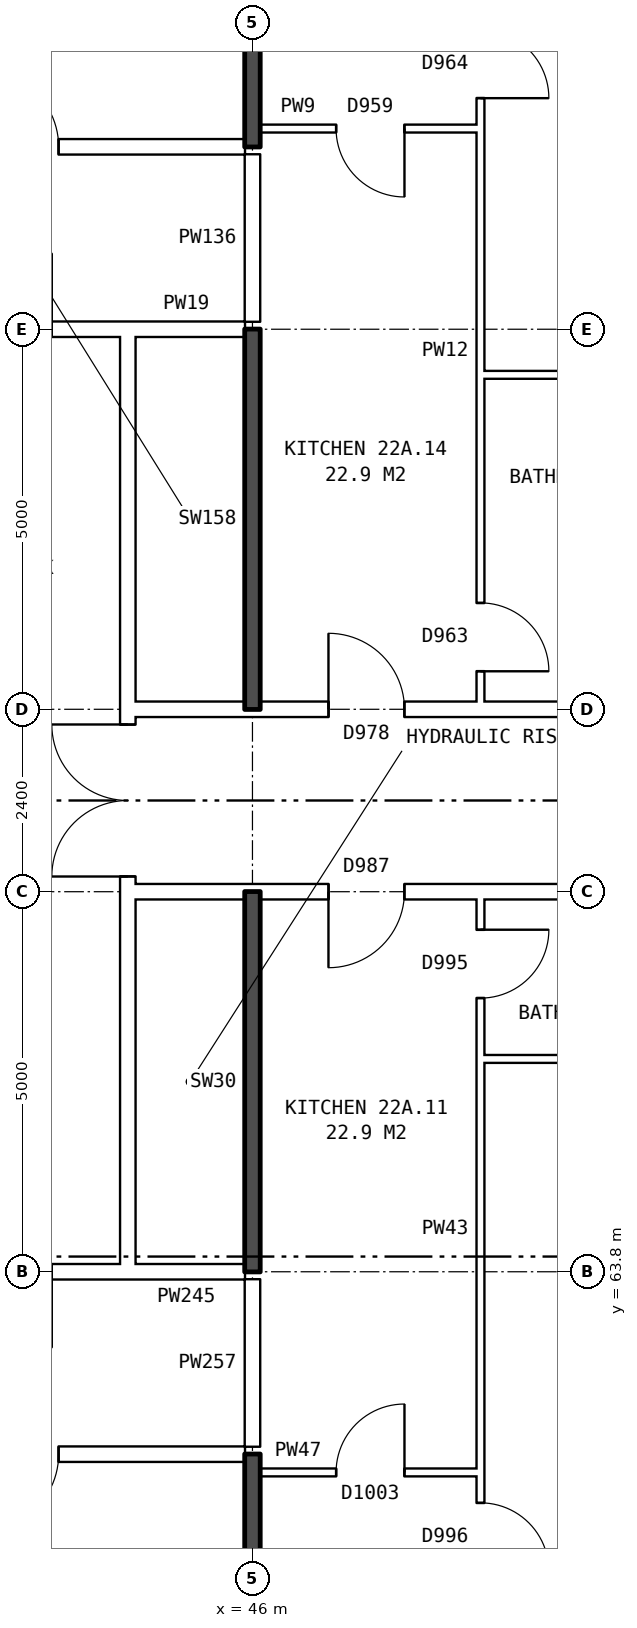
"""IFC4 building model, lengths in metres.
Left out: names, types, materials, properties, quantities, classifications, styles, units other than length and angle.
Written with IfcOpenShell. Run it as: python <this file> out.ifc"""

import sys

from ifc_helpers import new_model, si_unit, direction, frame, frame_2d, origin, place, context, subcontext, project, spatial, rectangle, extrude, element, fill, save


model = new_model("IFC4")
c1 = context("Model", 3, precision=1e-05, world=origin(), true_north=direction((0.0, 1.0)))
c2 = subcontext(c1, "Body", "Model", "MODEL_VIEW")
j1 = project(units=[si_unit("LENGTHUNIT", "METRE"), si_unit("PLANEANGLEUNIT", "RADIAN")], contexts=[c1])
p1 = place(None, origin())
s1 = spatial("IfcSite", under=j1, at=p1, CompositionType="ELEMENT")
p2 = place(p1, origin())
s2 = spatial("IfcBuilding", under=s1, at=p2, CompositionType="ELEMENT")
p3 = place(p2, frame((0.0, 0.0, 80.9)))
s3 = spatial("IfcBuildingStorey", under=s2, at=p3, CompositionType="ELEMENT", Elevation=80.9)
p4 = place(p3, frame((44.36, 63.9, 0.0), z_axis=(0.0, 0.0, 1.0), x_axis=(0.0, 1.0, 0.0)))
e1 = element("IfcWall", 1, at=p4, inside=s3, PredefinedType="PARTITIONING", context=c2, shape_type="SweptSolid", body=[
    extrude(rectangle(XDim=12.2, YDim=0.2, at=frame_2d((6.1, 0.0))), origin(), (0.0, 0.0, 1.0), 2.85),
])
p5 = place(p4, frame((5.1, 0.0, 0.0)))
e2 = element("IfcOpeningElement", 2, at=p5, cuts=e1, PredefinedType="OPENING", context=c2, shape_type="SweptSolid", body=[
    extrude(rectangle(XDim=2.0, YDim=2.1, at=frame_2d((1.0, 1.05))), frame((0.0, 0.11, 0.0), z_axis=(0.0, -1.0, 0.0), x_axis=(1.0, 0.0, 0.0)), (0.0, 0.0, 1.0), 0.22),
])
p6 = place(p3, frame((46.1, 61.16, 0.0), z_axis=(0.0, 0.0, 1.0), x_axis=(1.0, 0.0, 0.0)))
e3 = element("IfcWall", 3, at=p6, inside=s3, PredefinedType="PARTITIONING", context=c2, shape_type="SweptSolid", body=[
    extrude(rectangle(XDim=2.9, YDim=0.1, at=frame_2d((1.45, 0.0))), origin(), (0.0, 0.0, 1.0), 2.85),
])
p7 = place(p6, frame((1.0, 0.0, 0.0)))
e4 = element("IfcOpeningElement", 4, at=p7, cuts=e3, PredefinedType="OPENING", context=c2, shape_type="SweptSolid", body=[
    extrude(rectangle(XDim=0.9, YDim=2.1, at=frame_2d((0.45, 1.05))), frame((0.0, 0.06, 0.0), z_axis=(0.0, -1.0, 0.0), x_axis=(1.0, 0.0, 0.0)), (0.0, 0.0, 1.0), 0.12),
])
p8 = place(p3, frame((23.61, 61.4, 0.0), z_axis=(0.0, 0.0, 1.0), x_axis=(1.0, 0.0, 0.0)))
e5 = element("IfcWall", 5, at=p8, inside=s3, PredefinedType="PARTITIONING", context=c2, shape_type="SweptSolid", body=[
    extrude(rectangle(XDim=22.29, YDim=0.2, at=frame_2d((11.145, 0.0))), origin(), (0.0, 0.0, 1.0), 2.85),
])
p9 = place(p8, frame((18.84, 0.0, 0.0)))
e6 = element("IfcOpeningElement", 6, at=p9, cuts=e5, PredefinedType="OPENING", context=c2, shape_type="SweptSolid", body=[
    extrude(rectangle(XDim=1.0, YDim=2.1, at=frame_2d((0.5, 1.05))), frame((0.0, 0.11, 0.0), z_axis=(0.0, -1.0, 0.0), x_axis=(1.0, 0.0, 0.0)), (0.0, 0.0, 1.0), 0.22),
])
p10 = place(p8, frame((6.89, 0.0, 0.0)))
e7 = element("IfcOpeningElement", 7, at=p10, cuts=e5, PredefinedType="OPENING", context=c2, shape_type="SweptSolid", body=[
    extrude(rectangle(XDim=1.0, YDim=2.1, at=frame_2d((0.5, 1.05))), frame((0.0, 0.11, 0.0), z_axis=(0.0, -1.0, 0.0), x_axis=(1.0, 0.0, 0.0)), (0.0, 0.0, 1.0), 0.22),
])
p11 = place(p3, frame((41.36, 63.8, 0.0), z_axis=(0.0, 0.0, 1.0), x_axis=(1.0, 0.0, 0.0)))
e8 = element("IfcWall", 8, at=p11, inside=s3, PredefinedType="PARTITIONING", context=c2, shape_type="SweptSolid", body=[
    extrude(rectangle(XDim=3.0, YDim=0.2, at=frame_2d((1.5, 0.0))), origin(), (0.0, 0.0, 1.0), 2.85),
])
p12 = place(p11, frame((1.0, 0.0, 0.0)))
e9 = element("IfcOpeningElement", 9, at=p12, cuts=e8, PredefinedType="OPENING", context=c2, shape_type="SweptSolid", body=[
    extrude(rectangle(XDim=1.0, YDim=2.1, at=frame_2d((0.5, 1.05))), frame((0.0, 0.11, 0.0), z_axis=(0.0, -1.0, 0.0), x_axis=(1.0, 0.0, 0.0)), (0.0, 0.0, 1.0), 0.22),
])
p13 = place(p3, frame((44.36, 63.8, 0.0), z_axis=(0.0, 0.0, 1.0), x_axis=(1.0, 0.0, 0.0)))
e10 = element("IfcWall", 10, at=p13, inside=s3, PredefinedType="PARTITIONING", context=c2, shape_type="SweptSolid", body=[
    extrude(rectangle(XDim=1.54, YDim=0.2, at=frame_2d((0.77, 0.0))), origin(), (0.0, 0.0, 1.0), 2.85),
])
p14 = place(p3, frame((49.0, 66.6, 0.0), z_axis=(0.0, 0.0, 1.0), x_axis=(1.0, 0.0, 0.0)))
e11 = element("IfcWall", 11, at=p14, inside=s3, PredefinedType="PARTITIONING", context=c2, shape_type="SweptSolid", body=[
    extrude(rectangle(XDim=6.0, YDim=0.1, at=frame_2d((3.0, 0.0))), origin(), (0.0, 0.0, 1.0), 2.85),
])
p15 = place(p3, frame((44.36, 68.8, 0.0), z_axis=(0.0, 0.0, 1.0), x_axis=(1.0, 0.0, 0.0)))
e12 = element("IfcWall", 12, at=p15, inside=s3, PredefinedType="PARTITIONING", context=c2, shape_type="SweptSolid", body=[
    extrude(rectangle(XDim=19.28, YDim=0.2, at=frame_2d((9.64, 0.0))), origin(), (0.0, 0.0, 1.0), 2.85),
])
p16 = place(p15, frame((14.64, 0.0, 0.0)))
e13 = element("IfcOpeningElement", 13, at=p16, cuts=e12, PredefinedType="OPENING", context=c2, shape_type="SweptSolid", body=[
    extrude(rectangle(XDim=1.0, YDim=2.1, at=frame_2d((0.5, 1.05))), frame((0.0, 0.11, 0.0), z_axis=(0.0, -1.0, 0.0), x_axis=(1.0, 0.0, 0.0)), (0.0, 0.0, 1.0), 0.22),
])
p17 = place(p15, frame((11.64, 0.0, 0.0)))
e14 = element("IfcOpeningElement", 14, at=p17, cuts=e12, PredefinedType="OPENING", context=c2, shape_type="SweptSolid", body=[
    extrude(rectangle(XDim=1.0, YDim=2.1, at=frame_2d((0.5, 1.05))), frame((0.0, 0.11, 0.0), z_axis=(0.0, -1.0, 0.0), x_axis=(1.0, 0.0, 0.0)), (0.0, 0.0, 1.0), 0.22),
])
p18 = place(p15, frame((2.64, 0.0, 0.0)))
e15 = element("IfcOpeningElement", 15, at=p18, cuts=e12, PredefinedType="OPENING", context=c2, shape_type="SweptSolid", body=[
    extrude(rectangle(XDim=1.0, YDim=2.1, at=frame_2d((0.5, 1.05))), frame((0.0, 0.11, 0.0), z_axis=(0.0, -1.0, 0.0), x_axis=(1.0, 0.0, 0.0)), (0.0, 0.0, 1.0), 0.22),
])
p19 = place(p3, frame((44.36, 71.2, 0.0), z_axis=(0.0, 0.0, 1.0), x_axis=(1.0, 0.0, 0.0)))
e16 = element("IfcWall", 16, at=p19, inside=s3, PredefinedType="PARTITIONING", context=c2, shape_type="SweptSolid", body=[
    extrude(rectangle(XDim=19.28, YDim=0.2, at=frame_2d((9.64, 0.0))), origin(), (0.0, 0.0, 1.0), 2.85),
])
p20 = place(p19, frame((14.64, 0.0, 0.0)))
e17 = element("IfcOpeningElement", 17, at=p20, cuts=e16, PredefinedType="OPENING", context=c2, shape_type="SweptSolid", body=[
    extrude(rectangle(XDim=1.0, YDim=2.1, at=frame_2d((0.5, 1.05))), frame((0.0, 0.11, 0.0), z_axis=(0.0, -1.0, 0.0), x_axis=(1.0, 0.0, 0.0)), (0.0, 0.0, 1.0), 0.22),
])
p21 = place(p19, frame((8.64, 0.0, 0.0)))
e18 = element("IfcOpeningElement", 18, at=p21, cuts=e16, PredefinedType="OPENING", context=c2, shape_type="SweptSolid", body=[
    extrude(rectangle(XDim=1.0, YDim=2.1, at=frame_2d((0.5, 1.05))), frame((0.0, 0.11, 0.0), z_axis=(0.0, -1.0, 0.0), x_axis=(1.0, 0.0, 0.0)), (0.0, 0.0, 1.0), 0.22),
])
p22 = place(p19, frame((2.64, 0.0, 0.0)))
e19 = element("IfcOpeningElement", 19, at=p22, cuts=e16, PredefinedType="OPENING", context=c2, shape_type="SweptSolid", body=[
    extrude(rectangle(XDim=1.0, YDim=2.1, at=frame_2d((0.5, 1.05))), frame((0.0, 0.11, 0.0), z_axis=(0.0, -1.0, 0.0), x_axis=(1.0, 0.0, 0.0)), (0.0, 0.0, 1.0), 0.22),
])
p23 = place(p3, frame((49.0, 75.6, 0.0), z_axis=(0.0, 0.0, 1.0), x_axis=(1.0, 0.0, 0.0)))
e20 = element("IfcWall", 20, at=p23, inside=s3, PredefinedType="PARTITIONING", context=c2, shape_type="SweptSolid", body=[
    extrude(rectangle(XDim=2.9, YDim=0.1, at=frame_2d((1.45, 0.0))), origin(), (0.0, 0.0, 1.0), 2.85),
])
p24 = place(p3, frame((41.36, 76.2, 0.0), z_axis=(0.0, 0.0, 1.0), x_axis=(1.0, 0.0, 0.0)))
e21 = element("IfcWall", 21, at=p24, inside=s3, PredefinedType="PARTITIONING", context=c2, shape_type="SweptSolid", body=[
    extrude(rectangle(XDim=3.0, YDim=0.2, at=frame_2d((1.5, 0.0))), origin(), (0.0, 0.0, 1.0), 2.85),
])
p25 = place(p24, frame((1.0, 0.0, 0.0)))
e22 = element("IfcOpeningElement", 22, at=p25, cuts=e21, PredefinedType="OPENING", context=c2, shape_type="SweptSolid", body=[
    extrude(rectangle(XDim=1.0, YDim=2.1, at=frame_2d((0.5, 1.05))), frame((0.0, 0.11, 0.0), z_axis=(0.0, -1.0, 0.0), x_axis=(1.0, 0.0, 0.0)), (0.0, 0.0, 1.0), 0.22),
])
p26 = place(p3, frame((44.36, 76.2, 0.0), z_axis=(0.0, 0.0, 1.0), x_axis=(1.0, 0.0, 0.0)))
e23 = element("IfcWall", 23, at=p26, inside=s3, PredefinedType="PARTITIONING", context=c2, shape_type="SweptSolid", body=[
    extrude(rectangle(XDim=1.54, YDim=0.2, at=frame_2d((0.77, 0.0))), origin(), (0.0, 0.0, 1.0), 2.85),
])
p27 = place(p3, frame((23.61, 78.6, 0.0), z_axis=(0.0, 0.0, 1.0), x_axis=(1.0, 0.0, 0.0)))
e24 = element("IfcWall", 24, at=p27, inside=s3, PredefinedType="PARTITIONING", context=c2, shape_type="SweptSolid", body=[
    extrude(rectangle(XDim=22.29, YDim=0.2, at=frame_2d((11.145, 0.0))), origin(), (0.0, 0.0, 1.0), 2.85),
])
p28 = place(p27, frame((18.84, 0.0, 0.0)))
e25 = element("IfcOpeningElement", 25, at=p28, cuts=e24, PredefinedType="OPENING", context=c2, shape_type="SweptSolid", body=[
    extrude(rectangle(XDim=1.0, YDim=2.1, at=frame_2d((0.5, 1.05))), frame((0.0, 0.11, 0.0), z_axis=(0.0, -1.0, 0.0), x_axis=(1.0, 0.0, 0.0)), (0.0, 0.0, 1.0), 0.22),
])
p29 = place(p27, frame((6.89, 0.0, 0.0)))
e26 = element("IfcOpeningElement", 26, at=p29, cuts=e24, PredefinedType="OPENING", context=c2, shape_type="SweptSolid", body=[
    extrude(rectangle(XDim=1.0, YDim=2.1, at=frame_2d((0.5, 1.05))), frame((0.0, 0.11, 0.0), z_axis=(0.0, -1.0, 0.0), x_axis=(1.0, 0.0, 0.0)), (0.0, 0.0, 1.0), 0.22),
])
p30 = place(p3, frame((46.1, 78.84, 0.0), z_axis=(0.0, 0.0, 1.0), x_axis=(1.0, 0.0, 0.0)))
e27 = element("IfcWall", 27, at=p30, inside=s3, PredefinedType="PARTITIONING", context=c2, shape_type="SweptSolid", body=[
    extrude(rectangle(XDim=2.9, YDim=0.1, at=frame_2d((1.45, 0.0))), origin(), (0.0, 0.0, 1.0), 2.85),
])
p31 = place(p30, frame((1.0, 0.0, 0.0)))
e28 = element("IfcOpeningElement", 28, at=p31, cuts=e27, PredefinedType="OPENING", context=c2, shape_type="SweptSolid", body=[
    extrude(rectangle(XDim=0.9, YDim=2.1, at=frame_2d((0.45, 1.05))), frame((0.0, 0.06, 0.0), z_axis=(0.0, -1.0, 0.0), x_axis=(1.0, 0.0, 0.0)), (0.0, 0.0, 1.0), 0.12),
])
p32 = place(p3, frame((46.0, 54.36, 0.0), z_axis=(0.0, 0.0, 1.0), x_axis=(0.0, 1.0, 0.0)))
e29 = element("IfcWall", 29, at=p32, inside=s3, PredefinedType="SOLIDWALL", context=c2, shape_type="SweptSolid", body=[
    extrude(rectangle(XDim=7.04, YDim=0.2, at=frame_2d((3.52, 0.0))), origin(), (0.0, 0.0, 1.0), 2.85),
])
p33 = place(p3, frame((46.0, 61.5, 0.0), z_axis=(0.0, 0.0, 1.0), x_axis=(0.0, 1.0, 0.0)))
e30 = element("IfcWall", 30, at=p33, inside=s3, PredefinedType="PARTITIONING", context=c2, shape_type="SweptSolid", body=[
    extrude(rectangle(XDim=2.2, YDim=0.2, at=frame_2d((1.1, 0.0))), origin(), (0.0, 0.0, 1.0), 2.85),
])
for number, where, z_axis, x_axis in (
    (31, (46.0, 63.8, 0.0), (0.0, 0.0, 1.0), (0.0, 1.0, 0.0)),
    (32, (46.0, 71.2, 0.0), (0.0, 0.0, 1.0), (0.0, 1.0, 0.0)),
):
    element("IfcWall", number, at=place(p3, frame(where, z_axis=z_axis, x_axis=x_axis)), inside=s3, PredefinedType="SOLIDWALL", context=c2, shape_type="SweptSolid", body=[
        extrude(rectangle(XDim=5.0, YDim=0.2, at=frame_2d((2.5, 0.0))), origin(), (0.0, 0.0, 1.0), 2.85),
    ])
p34 = place(p3, frame((46.0, 76.3, 0.0), z_axis=(0.0, 0.0, 1.0), x_axis=(0.0, 1.0, 0.0)))
e33 = element("IfcWall", 33, at=p34, inside=s3, PredefinedType="PARTITIONING", context=c2, shape_type="SweptSolid", body=[
    extrude(rectangle(XDim=2.2, YDim=0.2, at=frame_2d((1.1, 0.0))), origin(), (0.0, 0.0, 1.0), 2.85),
])
p35 = place(p3, frame((46.0, 78.6, 0.0), z_axis=(0.0, 0.0, 1.0), x_axis=(0.0, 1.0, 0.0)))
e34 = element("IfcWall", 34, at=p35, inside=s3, PredefinedType="SOLIDWALL", context=c2, shape_type="SweptSolid", body=[
    extrude(rectangle(XDim=7.04, YDim=0.2, at=frame_2d((3.52, 0.0))), origin(), (0.0, 0.0, 1.0), 2.85),
])
p36 = place(p3, frame((49.0, 54.36, 0.0), z_axis=(0.0, 0.0, 1.0), x_axis=(0.0, 1.0, 0.0)))
e35 = element("IfcWall", 35, at=p36, inside=s3, PredefinedType="PARTITIONING", context=c2, shape_type="SweptSolid", body=[
    extrude(rectangle(XDim=14.34, YDim=0.1, at=frame_2d((7.17, 0.0))), origin(), (0.0, 0.0, 1.0), 2.85),
])
p37 = place(p36, frame((5.5, 0.0, 0.0)))
e36 = element("IfcOpeningElement", 36, at=p37, cuts=e35, PredefinedType="OPENING", context=c2, shape_type="SweptSolid", body=[
    extrude(rectangle(XDim=0.9, YDim=2.1, at=frame_2d((0.45, 1.05))), frame((0.0, 0.06, 0.0), z_axis=(0.0, -1.0, 0.0), x_axis=(1.0, 0.0, 0.0)), (0.0, 0.0, 1.0), 0.12),
])
p38 = place(p36, frame((13.04, 0.0, 0.0)))
e37 = element("IfcOpeningElement", 37, at=p38, cuts=e35, PredefinedType="OPENING", context=c2, shape_type="SweptSolid", body=[
    extrude(rectangle(XDim=0.9, YDim=2.1, at=frame_2d((0.45, 1.05))), frame((0.0, 0.06, 0.0), z_axis=(0.0, -1.0, 0.0), x_axis=(1.0, 0.0, 0.0)), (0.0, 0.0, 1.0), 0.12),
])
p39 = place(p3, frame((49.0, 71.3, 0.0), z_axis=(0.0, 0.0, 1.0), x_axis=(0.0, 1.0, 0.0)))
e38 = element("IfcWall", 38, at=p39, inside=s3, PredefinedType="PARTITIONING", context=c2, shape_type="SweptSolid", body=[
    extrude(rectangle(XDim=14.34, YDim=0.1, at=frame_2d((7.17, 0.0))), origin(), (0.0, 0.0, 1.0), 2.85),
])
p40 = place(p39, frame((7.94, 0.0, 0.0)))
e39 = element("IfcOpeningElement", 39, at=p40, cuts=e38, PredefinedType="OPENING", context=c2, shape_type="SweptSolid", body=[
    extrude(rectangle(XDim=0.9, YDim=2.1, at=frame_2d((0.45, 1.05))), frame((0.0, 0.06, 0.0), z_axis=(0.0, -1.0, 0.0), x_axis=(1.0, 0.0, 0.0)), (0.0, 0.0, 1.0), 0.12),
])
p41 = place(p39, frame((0.4, 0.0, 0.0)))
e40 = element("IfcOpeningElement", 40, at=p41, cuts=e38, PredefinedType="OPENING", context=c2, shape_type="SweptSolid", body=[
    extrude(rectangle(XDim=0.9, YDim=2.1, at=frame_2d((0.45, 1.05))), frame((0.0, 0.06, 0.0), z_axis=(0.0, -1.0, 0.0), x_axis=(1.0, 0.0, 0.0)), (0.0, 0.0, 1.0), 0.12),
])
p42 = place(p5, origin())
e41 = element("IfcDoor", 41, at=p42, inside=s3, OperationType="DOUBLE_DOOR_SINGLE_SWING", PredefinedType="DOOR", context=c2, shape_type="SweptSolid", body=[
    extrude(rectangle(XDim=2.0, YDim=2.1, at=frame_2d((1.0, 1.05))), frame((0.0, 0.025, 0.0), z_axis=(0.0, -1.0, 0.0), x_axis=(1.0, 0.0, 0.0)), (0.0, 0.0, 1.0), 0.05),
])
fill(e2, e41)
p43 = place(p37, frame((0.9, 0.0, 0.0), z_axis=(0.0, 0.0, 1.0), x_axis=(-1.0, 0.0, 0.0)))
e42 = element("IfcDoor", 42, at=p43, inside=s3, OperationType="SINGLE_SWING_RIGHT", PredefinedType="DOOR", context=c2, shape_type="SweptSolid", body=[
    extrude(rectangle(XDim=0.9, YDim=2.1, at=frame_2d((0.45, 1.05))), frame((0.0, 0.025, 0.0), z_axis=(0.0, -1.0, 0.0), x_axis=(1.0, 0.0, 0.0)), (0.0, 0.0, 1.0), 0.05),
])
fill(e36, e42)
p44 = place(p18, frame((1.0, 0.0, 0.0), z_axis=(0.0, 0.0, 1.0), x_axis=(-1.0, 0.0, 0.0)))
e43 = element("IfcDoor", 43, at=p44, inside=s3, OperationType="SINGLE_SWING_RIGHT", PredefinedType="DOOR", context=c2, shape_type="SweptSolid", body=[
    extrude(rectangle(XDim=1.0, YDim=2.1, at=frame_2d((0.5, 1.05))), frame((0.0, 0.025, 0.0), z_axis=(0.0, -1.0, 0.0), x_axis=(1.0, 0.0, 0.0)), (0.0, 0.0, 1.0), 0.05),
])
fill(e15, e43)
p45 = place(p7, origin())
e44 = element("IfcDoor", 44, at=p45, inside=s3, OperationType="SINGLE_SWING_RIGHT", PredefinedType="DOOR", context=c2, shape_type="SweptSolid", body=[
    extrude(rectangle(XDim=0.9, YDim=2.1, at=frame_2d((0.45, 1.05))), frame((0.0, 0.025, 0.0), z_axis=(0.0, -1.0, 0.0), x_axis=(1.0, 0.0, 0.0)), (0.0, 0.0, 1.0), 0.05),
])
fill(e4, e44)
p46 = place(p38, frame((0.9, 0.0, 0.0), z_axis=(0.0, 0.0, 1.0), x_axis=(-1.0, 0.0, 0.0)))
e45 = element("IfcDoor", 45, at=p46, inside=s3, OperationType="SINGLE_SWING_LEFT", PredefinedType="DOOR", context=c2, shape_type="SweptSolid", body=[
    extrude(rectangle(XDim=0.9, YDim=2.1, at=frame_2d((0.45, 1.05))), frame((0.0, 0.025, 0.0), z_axis=(0.0, -1.0, 0.0), x_axis=(1.0, 0.0, 0.0)), (0.0, 0.0, 1.0), 0.05),
])
fill(e37, e45)
p47 = place(p40, frame((0.9, 0.0, 0.0), z_axis=(0.0, 0.0, 1.0), x_axis=(-1.0, 0.0, 0.0)))
e46 = element("IfcDoor", 46, at=p47, inside=s3, OperationType="SINGLE_SWING_RIGHT", PredefinedType="DOOR", context=c2, shape_type="SweptSolid", body=[
    extrude(rectangle(XDim=0.9, YDim=2.1, at=frame_2d((0.45, 1.05))), frame((0.0, 0.025, 0.0), z_axis=(0.0, -1.0, 0.0), x_axis=(1.0, 0.0, 0.0)), (0.0, 0.0, 1.0), 0.05),
])
fill(e39, e46)
p48 = place(p22, origin())
e47 = element("IfcDoor", 47, at=p48, inside=s3, OperationType="SINGLE_SWING_LEFT", PredefinedType="DOOR", context=c2, shape_type="SweptSolid", body=[
    extrude(rectangle(XDim=1.0, YDim=2.1, at=frame_2d((0.5, 1.05))), frame((0.0, 0.025, 0.0), z_axis=(0.0, -1.0, 0.0), x_axis=(1.0, 0.0, 0.0)), (0.0, 0.0, 1.0), 0.05),
])
fill(e19, e47)
p49 = place(p31, frame((0.9, 0.0, 0.0), z_axis=(0.0, 0.0, 1.0), x_axis=(-1.0, 0.0, 0.0)))
e48 = element("IfcDoor", 48, at=p49, inside=s3, OperationType="SINGLE_SWING_LEFT", PredefinedType="DOOR", context=c2, shape_type="SweptSolid", body=[
    extrude(rectangle(XDim=0.9, YDim=2.1, at=frame_2d((0.45, 1.05))), frame((0.0, 0.025, 0.0), z_axis=(0.0, -1.0, 0.0), x_axis=(1.0, 0.0, 0.0)), (0.0, 0.0, 1.0), 0.05),
])
fill(e28, e48)
p50 = place(p41, frame((0.9, 0.0, 0.0), z_axis=(0.0, 0.0, 1.0), x_axis=(-1.0, 0.0, 0.0)))
e49 = element("IfcDoor", 49, at=p50, inside=s3, OperationType="SINGLE_SWING_RIGHT", PredefinedType="DOOR", context=c2, shape_type="SweptSolid", body=[
    extrude(rectangle(XDim=0.9, YDim=2.1, at=frame_2d((0.45, 1.05))), frame((0.0, 0.025, 0.0), z_axis=(0.0, -1.0, 0.0), x_axis=(1.0, 0.0, 0.0)), (0.0, 0.0, 1.0), 0.05),
])
fill(e40, e49)
p51 = place(p9, frame((1.0, 0.0, 0.0), z_axis=(0.0, 0.0, 1.0), x_axis=(-1.0, 0.0, 0.0)))
e50 = element("IfcDoor", 50, at=p51, inside=s3, OperationType="SINGLE_SWING_RIGHT", PredefinedType="DOOR", context=c2, shape_type="SweptSolid", body=[
    extrude(rectangle(XDim=1.0, YDim=2.1, at=frame_2d((0.5, 1.05))), frame((0.0, 0.025, 0.0), z_axis=(0.0, -1.0, 0.0), x_axis=(1.0, 0.0, 0.0)), (0.0, 0.0, 1.0), 0.05),
])
fill(e6, e50)
p52 = place(p28, origin())
e51 = element("IfcDoor", 51, at=p52, inside=s3, OperationType="SINGLE_SWING_LEFT", PredefinedType="DOOR", context=c2, shape_type="SweptSolid", body=[
    extrude(rectangle(XDim=1.0, YDim=2.1, at=frame_2d((0.5, 1.05))), frame((0.0, 0.025, 0.0), z_axis=(0.0, -1.0, 0.0), x_axis=(1.0, 0.0, 0.0)), (0.0, 0.0, 1.0), 0.05),
])
fill(e25, e51)
save(model, sys.argv[1])
